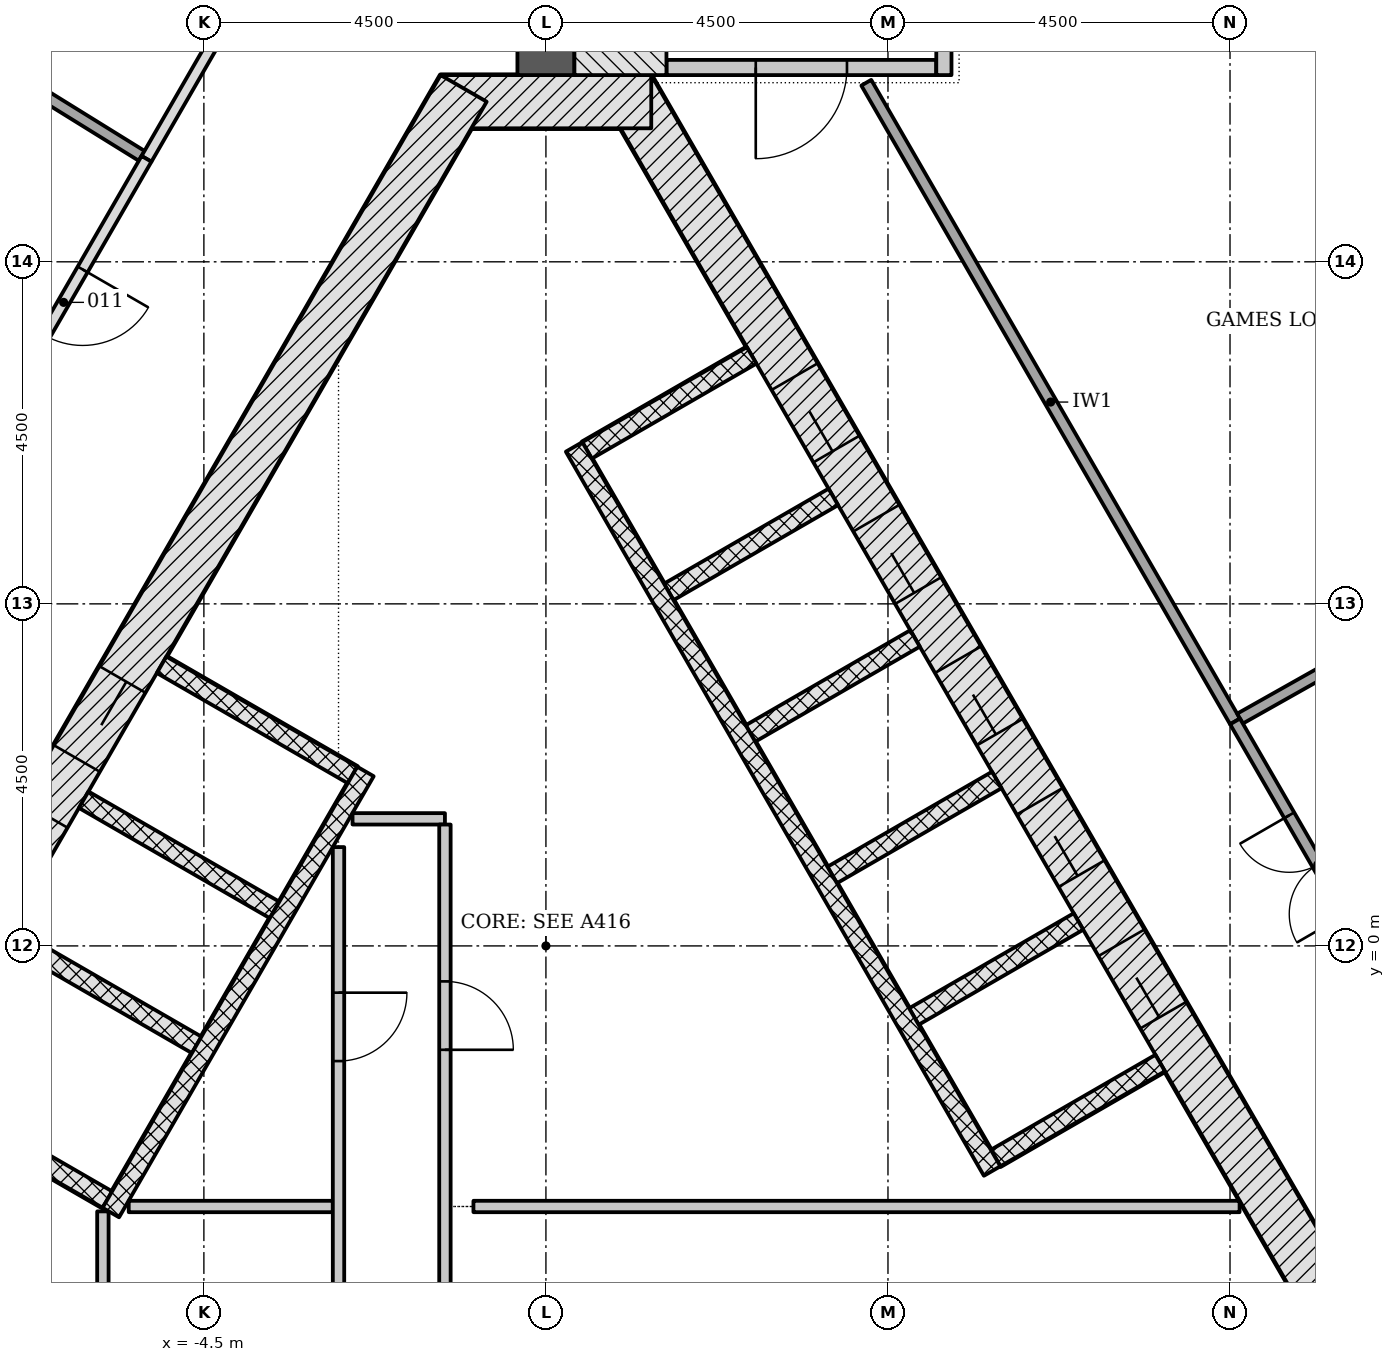
"""IFC4 building model, lengths in metres.
Left out: names, types, materials, properties, quantities, classifications, styles, units other than length and angle.
Written with IfcOpenShell. Run it as: python <this file> out.ifc"""

import sys

from ifc_helpers import new_model, si_unit, direction, frame, frame_2d, origin, place, context, subcontext, project, spatial, rectangle, extrude, element, fill, save


model = new_model("IFC4")
c1 = context("Model", 3, precision=1e-05, world=origin(), true_north=direction((0.0, 1.0)))
c2 = subcontext(c1, "Body", "Model", "MODEL_VIEW")
j1 = project(units=[si_unit("LENGTHUNIT", "METRE"), si_unit("PLANEANGLEUNIT", "RADIAN")], contexts=[c1])
p1 = place(None, origin())
s1 = spatial("IfcSite", under=j1, at=p1, CompositionType="ELEMENT")
p2 = place(p1, origin())
s2 = spatial("IfcBuilding", under=s1, at=p2, CompositionType="ELEMENT")
p3 = place(p2, frame((0.0, 0.0, 150.9)))
s3 = spatial("IfcBuildingStorey", under=s2, at=p3, CompositionType="ELEMENT", Elevation=150.9)
p4 = place(p3, frame((8.926, -6.753, -0.2), z_axis=(0.0, 0.0, 1.0), x_axis=(0.500042739161, 0.866000726912, 0.0)))
e1 = element("IfcWall", 1, at=p4, inside=s3, PredefinedType="SHEAR", context=c2, shape_type="SweptSolid", body=[
    extrude(rectangle(XDim=2.771, YDim=0.7, at=frame_2d((1.386, 0.0))), origin(), (0.0, 0.0, 1.0), 3.6),
])
p5 = place(p3, frame((10.311, -4.703, -0.2), z_axis=(0.0, 0.0, 1.0), x_axis=(-0.500001446645, 0.866024568562, 0.0)))
e2 = element("IfcWall", 2, at=p5, inside=s3, PredefinedType="SHEAR", context=c2, shape_type="SweptSolid", body=[
    extrude(rectangle(XDim=18.458, YDim=0.7, at=frame_2d((9.229, 0.0))), origin(), (0.0, 0.0, 1.0), 3.6),
])
p6 = place(p5, frame((4.379, 0.0, 0.2)))
e3 = element("IfcOpeningElement", 3, at=p6, cuts=e2, PredefinedType="OPENING", context=c2, shape_type="SweptSolid", body=[
    extrude(rectangle(XDim=1.1, YDim=2.1, at=frame_2d((0.55, 1.05))), frame((0.0, 0.36, 0.0), z_axis=(0.0, -1.0, 0.0), x_axis=(1.0, 0.0, 0.0)), (0.0, 0.0, 1.0), 0.72),
])
p7 = place(p5, frame((6.529, 0.0, 0.2)))
e4 = element("IfcOpeningElement", 4, at=p7, cuts=e2, PredefinedType="OPENING", context=c2, shape_type="SweptSolid", body=[
    extrude(rectangle(XDim=1.1, YDim=2.1, at=frame_2d((0.55, 1.05))), frame((0.0, 0.36, 0.0), z_axis=(0.0, -1.0, 0.0), x_axis=(1.0, 0.0, 0.0)), (0.0, 0.0, 1.0), 0.72),
])
p8 = place(p5, frame((8.679, 0.0, 0.2)))
e5 = element("IfcOpeningElement", 5, at=p8, cuts=e2, PredefinedType="OPENING", context=c2, shape_type="SweptSolid", body=[
    extrude(rectangle(XDim=1.1, YDim=2.1, at=frame_2d((0.55, 1.05))), frame((0.0, 0.36, 0.0), z_axis=(0.0, -1.0, 0.0), x_axis=(1.0, 0.0, 0.0)), (0.0, 0.0, 1.0), 0.72),
])
p9 = place(p5, frame((10.829, 0.0, 0.2)))
e6 = element("IfcOpeningElement", 6, at=p9, cuts=e2, PredefinedType="OPENING", context=c2, shape_type="SweptSolid", body=[
    extrude(rectangle(XDim=1.1, YDim=2.1, at=frame_2d((0.55, 1.05))), frame((0.0, 0.36, 0.0), z_axis=(0.0, -1.0, 0.0), x_axis=(1.0, 0.0, 0.0)), (0.0, 0.0, 1.0), 0.72),
])
p10 = place(p5, frame((12.979, 0.0, 0.2)))
e7 = element("IfcOpeningElement", 7, at=p10, cuts=e2, PredefinedType="OPENING", context=c2, shape_type="SweptSolid", body=[
    extrude(rectangle(XDim=1.1, YDim=2.1, at=frame_2d((0.55, 1.05))), frame((0.0, 0.36, 0.0), z_axis=(0.0, -1.0, 0.0), x_axis=(1.0, 0.0, 0.0)), (0.0, 0.0, 1.0), 0.72),
])
p11 = place(p3, frame((1.386, 11.106, -0.2), z_axis=(0.0, 0.0, 1.0), x_axis=(-1.0, 0.0, 0.0)))
e8 = element("IfcWall", 8, at=p11, inside=s3, PredefinedType="SHEAR", context=c2, shape_type="SweptSolid", body=[
    extrude(rectangle(XDim=2.771, YDim=0.7, at=frame_2d((1.386, 0.0))), origin(), (0.0, 0.0, 1.0), 3.6),
])
p12 = place(p3, frame((-1.083, 11.281, -0.2), z_axis=(0.0, 0.0, 1.0), x_axis=(-0.500001446645, -0.866024568562, 0.0)))
e9 = element("IfcWall", 9, at=p12, inside=s3, PredefinedType="SHEAR", context=c2, shape_type="SweptSolid", body=[
    extrude(rectangle(XDim=18.458, YDim=0.7, at=frame_2d((9.229, 0.0))), origin(), (0.0, 0.0, 1.0), 3.6),
])
p13 = place(p12, frame((8.979, 0.0, 0.2)))
e10 = element("IfcOpeningElement", 10, at=p13, cuts=e9, PredefinedType="OPENING", context=c2, shape_type="SweptSolid", body=[
    extrude(rectangle(XDim=1.2, YDim=2.1, at=frame_2d((0.6, 1.05))), frame((0.0, 0.36, 0.0), z_axis=(0.0, -1.0, 0.0), x_axis=(1.0, 0.0, 0.0)), (0.0, 0.0, 1.0), 0.72),
])
p14 = place(p12, frame((11.029, 0.0, 0.2)))
e11 = element("IfcOpeningElement", 11, at=p14, cuts=e9, PredefinedType="OPENING", context=c2, shape_type="SweptSolid", body=[
    extrude(rectangle(XDim=1.2, YDim=2.1, at=frame_2d((0.6, 1.05))), frame((0.0, 0.36, 0.0), z_axis=(0.0, -1.0, 0.0), x_axis=(1.0, 0.0, 0.0)), (0.0, 0.0, 1.0), 0.72),
])
p15 = place(p3, frame((0.0, 11.456, -0.2), z_axis=(0.0, 0.0, 1.0), x_axis=(0.0, 1.0, 0.0)))
e12 = element("IfcWall", 12, at=p15, inside=s3, PredefinedType="SHEAR", context=c2, shape_type="SweptSolid", body=[
    extrude(rectangle(XDim=10.736, YDim=0.75, at=frame_2d((5.368, 0.0))), origin(), (0.0, 0.0, 1.0), 3.6),
])
for number, where, z_axis, x_axis in (
    (13, (8.081, -1.541, -0.2), (0.0, 0.0, 1.0), (-0.866, -0.5, 0.0)),
    (14, (7.006, 0.321, -0.2), (0.0, 0.0, 1.0), (-0.866, -0.5, 0.0)),
):
    element("IfcWall", number, at=place(p3, frame(where, z_axis=z_axis, x_axis=x_axis)), inside=s3, PredefinedType="PARTITIONING", context=c2, shape_type="SweptSolid", body=[
        extrude(rectangle(XDim=2.5, YDim=0.25, at=frame_2d((1.25, 0.0))), origin(), (0.0, 0.0, 1.0), 3.6),
    ])
p16 = place(p3, frame((5.931, 2.183, -0.2), z_axis=(0.0, 0.0, 1.0), x_axis=(-0.866047370643, -0.499961950354, 0.0)))
e15 = element("IfcWall", 15, at=p16, inside=s3, PredefinedType="PARTITIONING", context=c2, shape_type="SweptSolid", body=[
    extrude(rectangle(XDim=2.5, YDim=0.25, at=frame_2d((1.25, 0.0))), origin(), (0.0, 0.0, 1.0), 3.6),
])
for number, where, z_axis, x_axis in (
    (16, (4.856, 4.045, -0.2), (0.0, 0.0, 1.0), (-0.866, -0.5, 0.0)),
    (17, (3.781, 5.907, -0.2), (0.0, 0.0, 1.0), (-0.866, -0.5, 0.0)),
    (18, (2.706, 7.769, -0.2), (0.0, 0.0, 1.0), (-0.866, -0.5, 0.0)),
):
    element("IfcWall", number, at=place(p3, frame(where, z_axis=z_axis, x_axis=x_axis)), inside=s3, PredefinedType="PARTITIONING", context=c2, shape_type="SweptSolid", body=[
        extrude(rectangle(XDim=2.5, YDim=0.25, at=frame_2d((1.25, 0.0))), origin(), (0.0, 0.0, 1.0), 3.6),
    ])
p17 = place(p3, frame((5.87, -2.961, 0.0), z_axis=(0.0, 0.0, 1.0), x_axis=(-0.50000615651, 0.866021849293, 0.0)))
e19 = element("IfcWall", 19, at=p17, inside=s3, PredefinedType="PARTITIONING", context=c2, shape_type="SweptSolid", body=[
    extrude(rectangle(XDim=11.0, YDim=0.25, at=frame_2d((5.5, 0.0))), origin(), (0.0, 0.0, 1.0), 3.4),
])
for number, where, z_axis, x_axis in (
    (20, (-5.056, 3.699, -0.2), (0.0, 0.0, 1.0), (0.866, -0.5, 0.0)),
    (21, (-6.081, 1.923, -0.2), (0.0, 0.0, 1.0), (0.866, -0.5, 0.0)),
    (22, (-7.106, 0.148, -0.2), (0.0, 0.0, 1.0), (0.866, -0.5, 0.0)),
    (23, (-8.281, -1.887, -0.2), (0.0, 0.0, 1.0), (0.866, -0.5, 0.0)),
):
    element("IfcWall", number, at=place(p3, frame(where, z_axis=z_axis, x_axis=x_axis)), inside=s3, PredefinedType="PARTITIONING", context=c2, shape_type="SweptSolid", body=[
        extrude(rectangle(XDim=2.9, YDim=0.25, at=frame_2d((1.45, 0.0))), origin(), (0.0, 0.0, 1.0), 3.6),
    ])
p18 = place(p3, frame((-2.374, 2.294, 0.0), z_axis=(0.0, 0.0, 1.0), x_axis=(-0.500003174267, -0.866023571113, 0.0)))
e24 = element("IfcWall", 24, at=p18, inside=s3, PredefinedType="PARTITIONING", context=c2, shape_type="SweptSolid", body=[
    extrude(rectangle(XDim=6.7, YDim=0.25, at=frame_2d((3.35, 0.0))), origin(), (0.0, 0.0, 1.0), 3.4),
])
p19 = place(p3, frame((-5.829, -3.492, 0.0), z_axis=(0.0, 0.0, 1.0), x_axis=(0.0, -1.0, 0.0)))
e25 = element("IfcWall", 25, at=p19, inside=s3, PredefinedType="PARTITIONING", context=c2, shape_type="SweptSolid", body=[
    extrude(rectangle(XDim=2.736, YDim=0.15, at=frame_2d((1.368, 0.0))), origin(), (0.0, 0.0, 1.0), 3.4),
])
p20 = place(p3, frame((-5.489, -3.428, 0.0), z_axis=(0.0, 0.0, 1.0), x_axis=(1.0, 0.0, 0.0)))
e26 = element("IfcWall", 26, at=p20, inside=s3, PredefinedType="PARTITIONING", context=c2, shape_type="SweptSolid", body=[
    extrude(rectangle(XDim=2.685, YDim=0.15, at=frame_2d((1.343, 0.0))), origin(), (0.0, 0.0, 1.0), 3.4),
])
p21 = place(p3, frame((-2.729, 1.3, 0.0), z_axis=(0.0, 0.0, 1.0), x_axis=(0.0, -1.0, 0.0)))
e27 = element("IfcWall", 27, at=p21, inside=s3, PredefinedType="PARTITIONING", context=c2, shape_type="SweptSolid", body=[
    extrude(rectangle(XDim=7.528, YDim=0.15, at=frame_2d((3.764, 0.0))), origin(), (0.0, 0.0, 1.0), 3.4),
])
p22 = place(p21, frame((1.915, 0.0, 0.0)))
e28 = element("IfcOpeningElement", 28, at=p22, cuts=e27, PredefinedType="OPENING", context=c2, shape_type="SweptSolid", body=[
    extrude(rectangle(XDim=0.9, YDim=2.1, at=frame_2d((0.45, 1.05))), frame((0.0, 0.085, 0.0), z_axis=(0.0, -1.0, 0.0), x_axis=(1.0, 0.0, 0.0)), (0.0, 0.0, 1.0), 0.17),
])
p23 = place(p3, frame((-2.544, 1.672, 0.0), z_axis=(0.0, 0.0, 1.0), x_axis=(1.0, 0.0, 0.0)))
e29 = element("IfcWall", 29, at=p23, inside=s3, PredefinedType="PARTITIONING", context=c2, shape_type="SweptSolid", body=[
    extrude(rectangle(XDim=1.216, YDim=0.15, at=frame_2d((0.608, 0.0))), origin(), (0.0, 0.0, 1.0), 3.4),
])
p24 = place(p3, frame((-1.329, 1.597, 0.0), z_axis=(0.0, 0.0, 1.0), x_axis=(0.0, -1.0, 0.0)))
e30 = element("IfcWall", 30, at=p24, inside=s3, PredefinedType="PARTITIONING", context=c2, shape_type="SweptSolid", body=[
    extrude(rectangle(XDim=7.825, YDim=0.15, at=frame_2d((3.913, 0.0))), origin(), (0.0, 0.0, 1.0), 3.4),
])
p25 = place(p24, frame((2.063, 0.0, 0.0)))
e31 = element("IfcOpeningElement", 31, at=p25, cuts=e30, PredefinedType="OPENING", context=c2, shape_type="SweptSolid", body=[
    extrude(rectangle(XDim=0.9, YDim=2.1, at=frame_2d((0.45, 1.05))), frame((0.0, 0.085, 0.0), z_axis=(0.0, -1.0, 0.0), x_axis=(1.0, 0.0, 0.0)), (0.0, 0.0, 1.0), 0.17),
])
p26 = place(p3, frame((-0.954, -3.428, 0.0), z_axis=(0.0, 0.0, 1.0), x_axis=(1.0, 0.0, 0.0)))
e32 = element("IfcWall", 32, at=p26, inside=s3, PredefinedType="PARTITIONING", context=c2, shape_type="SweptSolid", body=[
    extrude(rectangle(XDim=10.08, YDim=0.15, at=frame_2d((5.04, 0.0))), origin(), (0.0, 0.0, 1.0), 3.4),
])
p27 = place(p3, frame((5.135, 11.556, -0.2), z_axis=(0.0, 0.0, 1.0), x_axis=(-1.0, 0.0, 0.0)))
e33 = element("IfcWall", 33, at=p27, inside=s3, PredefinedType="SHEAR", context=c2, shape_type="SweptSolid", body=[
    extrude(rectangle(XDim=3.55, YDim=0.2, at=frame_2d((1.775, 0.0))), origin(), (0.0, 0.0, 1.0), 3.6),
])
p28 = place(p27, frame((1.175, 0.0, 0.2)))
e34 = element("IfcOpeningElement", 34, at=p28, cuts=e33, PredefinedType="OPENING", context=c2, shape_type="SweptSolid", body=[
    extrude(rectangle(XDim=1.2, YDim=2.1, at=frame_2d((0.6, 1.05))), frame((0.0, 0.11, 0.0), z_axis=(0.0, -1.0, 0.0), x_axis=(1.0, 0.0, 0.0)), (0.0, 0.0, 1.0), 0.22),
])
p29 = place(p3, frame((5.236, 11.456, -0.2), z_axis=(0.0, 0.0, 1.0), x_axis=(0.0, 1.0, 0.0)))
e35 = element("IfcWall", 35, at=p29, inside=s3, PredefinedType="SHEAR", context=c2, shape_type="SweptSolid", body=[
    extrude(rectangle(XDim=5.6, YDim=0.2, at=frame_2d((2.8, 0.0))), origin(), (0.0, 0.0, 1.0), 3.6),
])
p30 = place(p29, frame((0.45, 0.0, 0.2)))
e36 = element("IfcOpeningElement", 36, at=p30, cuts=e35, PredefinedType="OPENING", context=c2, shape_type="SweptSolid", body=[
    extrude(rectangle(XDim=1.2, YDim=2.1, at=frame_2d((0.6, 1.05))), frame((0.0, 0.11, 0.0), z_axis=(0.0, -1.0, 0.0), x_axis=(1.0, 0.0, 0.0)), (0.0, 0.0, 1.0), 0.22),
])
p31 = place(p3, frame((0.98, 11.456, -0.2), z_axis=(0.0, 0.0, 1.0), x_axis=(0.0, 1.0, 0.0)))
e37 = element("IfcWall", 37, at=p31, inside=s3, PredefinedType="SHEAR", context=c2, shape_type="SweptSolid", body=[
    extrude(rectangle(XDim=7.2, YDim=1.211, at=frame_2d((3.6, 0.0))), origin(), (0.0, 0.0, 1.0), 3.6),
])
p32 = place(p3, frame((9.066, 2.953, 0.0), z_axis=(0.0, 0.0, 1.0), x_axis=(-0.500003417229, 0.866023430837, 0.0)))
e38 = element("IfcWall", 38, at=p32, inside=s3, PredefinedType="PARTITIONING", context=c2, shape_type="SweptSolid", body=[
    extrude(rectangle(XDim=9.703, YDim=0.15, at=frame_2d((4.852, 0.0))), origin(), (0.0, 0.0, 1.0), 2.847),
])
p33 = place(p3, frame((14.735, 6.149, 0.0), z_axis=(0.0, 0.0, 1.0), x_axis=(-0.871163720424, -0.490992639676, 0.0)))
e39 = element("IfcWall", 39, at=p33, inside=s3, PredefinedType="PARTITIONING", context=c2, shape_type="SweptSolid", body=[
    extrude(rectangle(XDim=6.433, YDim=0.15, at=frame_2d((3.216, 0.0))), origin(), (0.0, 0.0, 1.0), 3.4),
])
p34 = place(p33, frame((2.754, 0.0, 0.0)))
e40 = element("IfcOpeningElement", 40, at=p34, cuts=e39, PredefinedType="OPENING", context=c2, shape_type="SweptSolid", body=[
    extrude(rectangle(XDim=1.0, YDim=2.1, at=frame_2d((0.5, 1.05))), frame((0.0, 0.085, 0.0), z_axis=(0.0, -1.0, 0.0), x_axis=(1.0, 0.0, 0.0)), (0.0, 0.0, 1.0), 0.17),
])
p35 = place(p3, frame((11.242, -0.816, 0.0), z_axis=(0.0, 0.0, 1.0), x_axis=(-0.499994385119, 0.866028645513, 0.0)))
e41 = element("IfcWall", 41, at=p35, inside=s3, PredefinedType="PARTITIONING", context=c2, shape_type="SweptSolid", body=[
    extrude(rectangle(XDim=4.352, YDim=0.15, at=frame_2d((2.176, 0.0))), origin(), (0.0, 0.0, 1.0), 2.847),
])
p36 = place(p35, frame((1.426, 0.0, 0.0)))
e42 = element("IfcOpeningElement", 42, at=p36, cuts=e41, PredefinedType="OPENING", context=c2, shape_type="SweptSolid", body=[
    extrude(rectangle(XDim=1.5, YDim=2.1, at=frame_2d((0.75, 1.05))), frame((0.0, 0.085, 0.0), z_axis=(0.0, -1.0, 0.0), x_axis=(1.0, 0.0, 0.0)), (0.0, 0.0, 1.0), 0.17),
])
p37 = place(p3, frame((-0.375, 18.807, 0.0), z_axis=(0.0, 0.0, 1.0), x_axis=(-0.500002508028, -0.866023955769, 0.0)))
e43 = element("IfcWall", 43, at=p37, inside=s3, PredefinedType="PARTITIONING", context=c2, shape_type="SweptSolid", body=[
    extrude(rectangle(XDim=9.76, YDim=0.15, at=frame_2d((4.88, 0.0))), origin(), (0.0, 0.0, 1.0), 2.847),
])
p38 = place(p3, frame((-10.374, 13.526, 0.0), z_axis=(0.0, 0.0, 1.0), x_axis=(0.85006997005, -0.526669769418, 0.0)))
e44 = element("IfcWall", 44, at=p38, inside=s3, PredefinedType="PARTITIONING", context=c2, shape_type="SweptSolid", body=[
    extrude(rectangle(XDim=5.947, YDim=0.15, at=frame_2d((2.973, 0.0))), origin(), (0.0, 0.0, 1.0), 3.4),
])
p39 = place(p38, frame((2.511, 0.0, 0.0)))
e45 = element("IfcOpeningElement", 45, at=p39, cuts=e44, PredefinedType="OPENING", context=c2, shape_type="SweptSolid", body=[
    extrude(rectangle(XDim=1.0, YDim=2.1, at=frame_2d((0.5, 1.05))), frame((0.0, 0.085, 0.0), z_axis=(0.0, -1.0, 0.0), x_axis=(1.0, 0.0, 0.0)), (0.0, 0.0, 1.0), 0.17),
])
p40 = place(p3, frame((-5.255, 10.355, 0.0), z_axis=(0.0, 0.0, 1.0), x_axis=(-0.499980937175, -0.866036409432, 0.0)))
e46 = element("IfcWall", 46, at=p40, inside=s3, PredefinedType="PARTITIONING", context=c2, shape_type="SweptSolid", body=[
    extrude(rectangle(XDim=4.361, YDim=0.15, at=frame_2d((2.18, 0.0))), origin(), (0.0, 0.0, 1.0), 2.847),
])
p41 = place(p40, frame((1.68, 0.0, 0.0)))
e47 = element("IfcOpeningElement", 47, at=p41, cuts=e46, PredefinedType="OPENING", context=c2, shape_type="SweptSolid", body=[
    extrude(rectangle(XDim=1.0, YDim=2.1, at=frame_2d((0.5, 1.05))), frame((0.0, 0.085, 0.0), z_axis=(0.0, -1.0, 0.0), x_axis=(1.0, 0.0, 0.0)), (0.0, 0.0, 1.0), 0.17),
])
p42 = place(p6, origin())
e48 = element("IfcDoor", 48, at=p42, inside=s3, OperationType="DOUBLE_DOOR_SLIDING", PredefinedType="DOOR", context=c2, shape_type="SweptSolid", body=[
    extrude(rectangle(XDim=1.1, YDim=2.1, at=frame_2d((0.55, 1.05))), frame((0.0, 0.025, 0.0), z_axis=(0.0, -1.0, 0.0), x_axis=(1.0, 0.0, 0.0)), (0.0, 0.0, 1.0), 0.05),
])
fill(e3, e48)
p43 = place(p7, origin())
e49 = element("IfcDoor", 49, at=p43, inside=s3, OperationType="DOUBLE_DOOR_SLIDING", PredefinedType="DOOR", context=c2, shape_type="SweptSolid", body=[
    extrude(rectangle(XDim=1.1, YDim=2.1, at=frame_2d((0.55, 1.05))), frame((0.0, 0.025, 0.0), z_axis=(0.0, -1.0, 0.0), x_axis=(1.0, 0.0, 0.0)), (0.0, 0.0, 1.0), 0.05),
])
fill(e4, e49)
p44 = place(p8, origin())
e50 = element("IfcDoor", 50, at=p44, inside=s3, OperationType="DOUBLE_DOOR_SLIDING", PredefinedType="DOOR", context=c2, shape_type="SweptSolid", body=[
    extrude(rectangle(XDim=1.1, YDim=2.1, at=frame_2d((0.55, 1.05))), frame((0.0, 0.025, 0.0), z_axis=(0.0, -1.0, 0.0), x_axis=(1.0, 0.0, 0.0)), (0.0, 0.0, 1.0), 0.05),
])
fill(e5, e50)
p45 = place(p9, origin())
e51 = element("IfcDoor", 51, at=p45, inside=s3, OperationType="DOUBLE_DOOR_SLIDING", PredefinedType="DOOR", context=c2, shape_type="SweptSolid", body=[
    extrude(rectangle(XDim=1.1, YDim=2.1, at=frame_2d((0.55, 1.05))), frame((0.0, 0.025, 0.0), z_axis=(0.0, -1.0, 0.0), x_axis=(1.0, 0.0, 0.0)), (0.0, 0.0, 1.0), 0.05),
])
fill(e6, e51)
p46 = place(p10, origin())
e52 = element("IfcDoor", 52, at=p46, inside=s3, OperationType="DOUBLE_DOOR_SLIDING", PredefinedType="DOOR", context=c2, shape_type="SweptSolid", body=[
    extrude(rectangle(XDim=1.1, YDim=2.1, at=frame_2d((0.55, 1.05))), frame((0.0, 0.025, 0.0), z_axis=(0.0, -1.0, 0.0), x_axis=(1.0, 0.0, 0.0)), (0.0, 0.0, 1.0), 0.05),
])
fill(e7, e52)
p47 = place(p13, origin())
e53 = element("IfcDoor", 53, at=p47, inside=s3, OperationType="DOUBLE_DOOR_SLIDING", PredefinedType="DOOR", context=c2, shape_type="SweptSolid", body=[
    extrude(rectangle(XDim=1.2, YDim=2.1, at=frame_2d((0.6, 1.05))), frame((0.0, 0.025, 0.0), z_axis=(0.0, -1.0, 0.0), x_axis=(1.0, 0.0, 0.0)), (0.0, 0.0, 1.0), 0.05),
])
fill(e10, e53)
p48 = place(p22, origin())
e54 = element("IfcDoor", 54, at=p48, inside=s3, OperationType="SINGLE_SWING_LEFT", PredefinedType="DOOR", context=c2, shape_type="SweptSolid", body=[
    extrude(rectangle(XDim=0.9, YDim=2.1, at=frame_2d((0.45, 1.05))), frame((0.0, 0.025, 0.0), z_axis=(0.0, -1.0, 0.0), x_axis=(1.0, 0.0, 0.0)), (0.0, 0.0, 1.0), 0.05),
])
fill(e28, e54)
p49 = place(p25, origin())
e55 = element("IfcDoor", 55, at=p49, inside=s3, OperationType="SINGLE_SWING_RIGHT", PredefinedType="DOOR", context=c2, shape_type="SweptSolid", body=[
    extrude(rectangle(XDim=0.9, YDim=2.1, at=frame_2d((0.45, 1.05))), frame((0.0, 0.025, 0.0), z_axis=(0.0, -1.0, 0.0), x_axis=(1.0, 0.0, 0.0)), (0.0, 0.0, 1.0), 0.05),
])
fill(e31, e55)
p50 = place(p28, origin())
e56 = element("IfcDoor", 56, at=p50, inside=s3, OperationType="SINGLE_SWING_RIGHT", PredefinedType="DOOR", context=c2, shape_type="SweptSolid", body=[
    extrude(rectangle(XDim=1.2, YDim=2.1, at=frame_2d((0.6, 1.05))), frame((0.0, 0.025, 0.0), z_axis=(0.0, -1.0, 0.0), x_axis=(1.0, 0.0, 0.0)), (0.0, 0.0, 1.0), 0.05),
])
fill(e34, e56)
p51 = place(p36, origin())
e57 = element("IfcDoor", 57, at=p51, inside=s3, OperationType="DOUBLE_DOOR_SINGLE_SWING", PredefinedType="DOOR", context=c2, shape_type="SweptSolid", body=[
    extrude(rectangle(XDim=1.5, YDim=2.1, at=frame_2d((0.75, 1.05))), frame((0.0, 0.025, 0.0), z_axis=(0.0, -1.0, 0.0), x_axis=(1.0, 0.0, 0.0)), (0.0, 0.0, 1.0), 0.05),
])
fill(e42, e57)
p52 = place(p41, origin())
e58 = element("IfcDoor", 58, at=p52, inside=s3, OperationType="SINGLE_SWING_LEFT", PredefinedType="DOOR", context=c2, shape_type="SweptSolid", body=[
    extrude(rectangle(XDim=1.0, YDim=2.1, at=frame_2d((0.5, 1.05))), frame((0.0, 0.025, 0.0), z_axis=(0.0, -1.0, 0.0), x_axis=(1.0, 0.0, 0.0)), (0.0, 0.0, 1.0), 0.05),
])
fill(e47, e58)
save(model, sys.argv[1])
